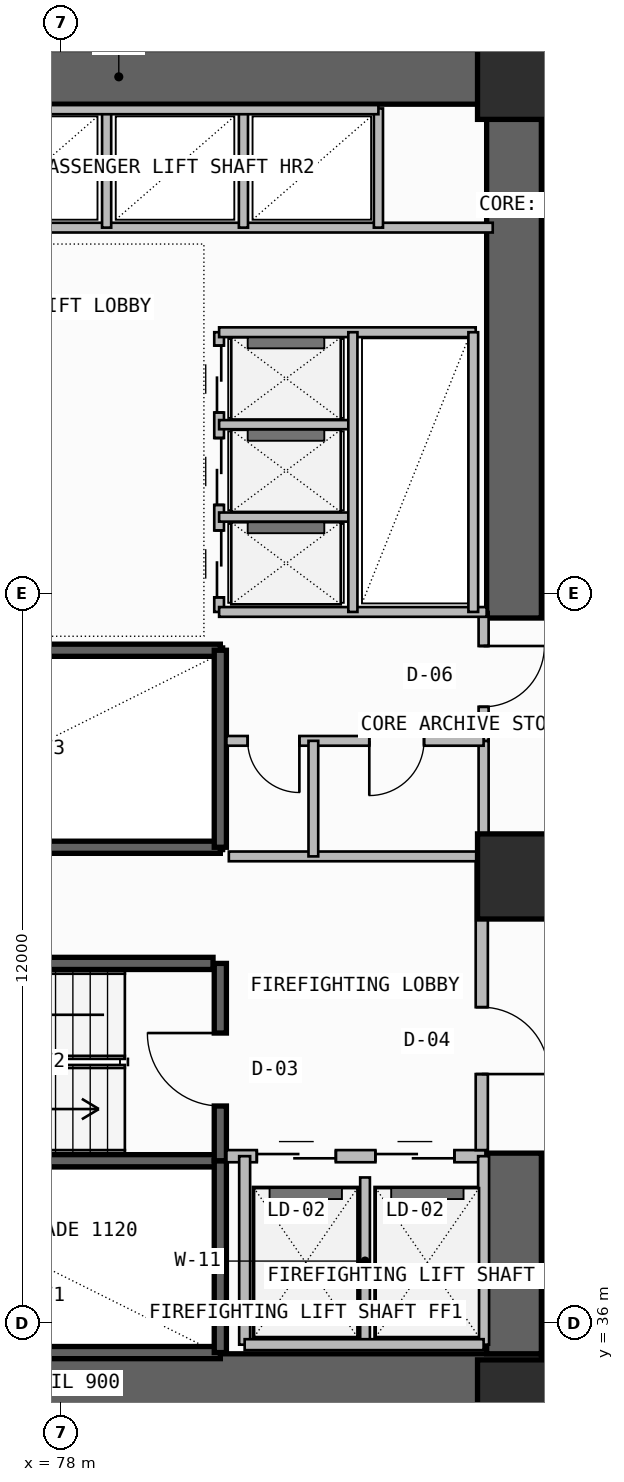
"""IFC4 building model, lengths in metres.
Left out: names, types, materials, properties, quantities, classifications, styles, units other than length and angle.
Written with IfcOpenShell. Run it as: python <this file> out.ifc"""

import sys

from ifc_helpers import new_model, si_unit, direction, frame, frame_2d, origin, origin_2d, place, context, subcontext, project, spatial, rectangle, extrude, element, fill, save


model = new_model("IFC4")
c1 = context("Model", 3, precision=1e-05, world=origin(), true_north=direction((0.0, 1.0)))
c2 = subcontext(c1, "Body", "Model", "MODEL_VIEW")
j1 = project(units=[si_unit("LENGTHUNIT", "METRE"), si_unit("PLANEANGLEUNIT", "RADIAN")], contexts=[c1])
p1 = place(None, origin())
s1 = spatial("IfcSite", under=j1, at=p1, CompositionType="ELEMENT")
p2 = place(p1, origin())
s2 = spatial("IfcBuilding", under=s1, at=p2, CompositionType="ELEMENT")
p3 = place(p2, frame((0.0, 0.0, 150.3)))
s3 = spatial("IfcBuildingStorey", under=s2, at=p3, CompositionType="ELEMENT", Elevation=150.3)
p4 = place(p3, frame((72.0, 35.05, -0.26), z_axis=(0.0, 0.0, 1.0), x_axis=(1.0, 0.0, 0.0)))
e1 = element("IfcWall", 1, at=p4, inside=s3, PredefinedType="SHEAR", context=c2, shape_type="SweptSolid", body=[
    extrude(rectangle(XDim=13.9, YDim=0.9, at=frame_2d((6.95, 0.0))), origin(), (0.0, 0.0, 1.0), 3.6),
])
p5 = place(p3, frame((85.45, 35.5, -0.26), z_axis=(0.0, 0.0, 1.0), x_axis=(0.0, 1.0, 0.0)))
e2 = element("IfcWall", 2, at=p5, inside=s3, PredefinedType="SHEAR", context=c2, shape_type="SweptSolid", body=[
    extrude(rectangle(XDim=3.3, YDim=0.9, at=frame_2d((1.65, 0.0))), origin(), (0.0, 0.0, 1.0), 3.6),
])
p6 = place(p3, frame((72.0, 56.5, -0.26), z_axis=(0.0, 0.0, 1.0), x_axis=(1.0, 0.0, 0.0)))
e3 = element("IfcWall", 3, at=p6, inside=s3, PredefinedType="SHEAR", context=c2, shape_type="SweptSolid", body=[
    extrude(rectangle(XDim=13.9, YDim=0.9, at=frame_2d((6.95, 0.0))), origin(), (0.0, 0.0, 1.0), 3.6),
])
p7 = place(p3, frame((85.45, 47.6, -0.26), z_axis=(0.0, 0.0, 1.0), x_axis=(0.0, 1.0, 0.0)))
e4 = element("IfcWall", 4, at=p7, inside=s3, PredefinedType="SHEAR", context=c2, shape_type="SweptSolid", body=[
    extrude(rectangle(XDim=8.45, YDim=0.9, at=frame_2d((4.225, 0.0))), origin(), (0.0, 0.0, 1.0), 3.6),
])
for number, where, z_axis, x_axis in (
    (5, (85.55, 34.7, 0.0), (0.0, 0.0, 1.0), (1.0, 0.0, 0.0)),
    (6, (85.55, 43.35, 0.0), (0.0, 0.0, 1.0), (1.0, 0.0, 0.0)),
    (7, (85.55, 56.5, 0.0), (0.0, 0.0, 1.0), (1.0, 0.0, 0.0)),
):
    element("IfcColumn", number, at=place(p3, frame(where, z_axis=z_axis, x_axis=x_axis)), inside=s3, PredefinedType="COLUMN", context=c2, shape_type="SweptSolid", body=[
        extrude(rectangle(XDim=1.4, YDim=1.4, at=origin_2d()), origin(), (0.0, 0.0, 1.0), 3.6),
    ])
for number, where, z_axis, x_axis in (
    (8, (72.92, 35.52, -0.26), (0.0, 0.0, 1.0), (1.0, 0.0, 0.0)),
    (9, (72.92, 38.675, -0.26), (0.0, 0.0, 1.0), (1.0, 0.0, 0.0)),
):
    element("IfcWall", number, at=place(p3, frame(where, z_axis=z_axis, x_axis=x_axis)), inside=s3, PredefinedType="SOLIDWALL", context=c2, shape_type="SweptSolid", body=[
        extrude(rectangle(XDim=7.7, YDim=0.2, at=frame_2d((3.85, 0.0))), origin(), (0.0, 0.0, 1.0), 3.6),
    ])
p8 = place(p3, frame((80.62, 35.52, -0.26), z_axis=(0.0, 0.0, 1.0), x_axis=(0.0, 1.0, 0.0)))
e10 = element("IfcWall", 10, at=p8, inside=s3, PredefinedType="SOLIDWALL", context=c2, shape_type="SweptSolid", body=[
    extrude(rectangle(XDim=3.155, YDim=0.2, at=frame_2d((1.578, 0.0))), origin(), (0.0, 0.0, 1.0), 3.6),
])
p9 = place(p3, frame((80.62, 38.675, -0.26), z_axis=(0.0, 0.0, 1.0), x_axis=(0.0, 1.0, 0.0)))
e11 = element("IfcWall", 11, at=p9, inside=s3, PredefinedType="SOLIDWALL", context=c2, shape_type="SweptSolid", body=[
    extrude(rectangle(XDim=3.245, YDim=0.2, at=frame_2d((1.623, 0.0))), origin(), (0.0, 0.0, 1.0), 3.6),
])
p10 = place(p9, frame((0.9, 0.0, 0.26)))
e12 = element("IfcOpeningElement", 12, at=p10, cuts=e11, PredefinedType="OPENING", context=c2, shape_type="SweptSolid", body=[
    extrude(rectangle(XDim=1.2, YDim=2.2, at=frame_2d((0.6, 1.1))), frame((0.0, 0.11, 0.0), z_axis=(0.0, -1.0, 0.0), x_axis=(1.0, 0.0, 0.0)), (0.0, 0.0, 1.0), 0.22),
])
p11 = place(p3, frame((80.72, 38.75, 0.0), z_axis=(0.0, 0.0, 1.0), x_axis=(1.0, 0.0, 0.0)))
e13 = element("IfcWall", 13, at=p11, inside=s3, PredefinedType="SOLIDWALL", context=c2, shape_type="SweptSolid", body=[
    extrude(rectangle(XDim=4.26, YDim=0.2, at=frame_2d((2.13, 0.0))), origin(), (0.0, 0.0, 1.0), 3.34),
])
p12 = place(p11, frame((0.5, 0.0, 0.0)))
e14 = element("IfcOpeningElement", 14, at=p12, cuts=e13, PredefinedType="OPENING", context=c2, shape_type="SweptSolid", body=[
    extrude(rectangle(XDim=1.3, YDim=2.3, at=frame_2d((0.65, 1.15))), frame((0.0, 0.11, 0.0), z_axis=(0.0, -1.0, 0.0), x_axis=(1.0, 0.0, 0.0)), (0.0, 0.0, 1.0), 0.22),
])
p13 = place(p11, frame((2.45, 0.0, 0.0)))
e15 = element("IfcOpeningElement", 15, at=p13, cuts=e13, PredefinedType="OPENING", context=c2, shape_type="SweptSolid", body=[
    extrude(rectangle(XDim=1.3, YDim=2.3, at=frame_2d((0.65, 1.15))), frame((0.0, 0.11, 0.0), z_axis=(0.0, -1.0, 0.0), x_axis=(1.0, 0.0, 0.0)), (0.0, 0.0, 1.0), 0.22),
])
p14 = place(p3, frame((83.0, 35.65, 0.0), z_axis=(0.0, 0.0, 1.0), x_axis=(0.0, 1.0, 0.0)))
e16 = element("IfcWall", 16, at=p14, inside=s3, PredefinedType="PLUMBINGWALL", context=c2, shape_type="SweptSolid", body=[
    extrude(rectangle(XDim=2.75, YDim=0.16, at=frame_2d((1.375, 0.0))), origin(), (0.0, 0.0, 1.0), 3.34),
])
for number, where, z_axis, x_axis in (
    (17, (84.95, 35.65, 0.0), (0.0, 0.0, 1.0), (0.0, 1.0, 0.0)),
    (18, (81.02, 35.65, 0.0), (0.0, 0.0, 1.0), (0.0, 1.0, 0.0)),
):
    element("IfcWall", number, at=place(p3, frame(where, z_axis=z_axis, x_axis=x_axis)), inside=s3, PredefinedType="SOLIDWALL", context=c2, shape_type="SweptSolid", body=[
        extrude(rectangle(XDim=3.1, YDim=0.18, at=frame_2d((1.55, 0.0))), origin(), (0.0, 0.0, 1.0), 3.34),
    ])
p15 = place(p3, frame((81.02, 35.65, 0.0), z_axis=(0.0, 0.0, 1.0), x_axis=(1.0, 0.0, 0.0)))
e19 = element("IfcWall", 19, at=p15, inside=s3, PredefinedType="SOLIDWALL", context=c2, shape_type="SweptSolid", body=[
    extrude(rectangle(XDim=3.93, YDim=0.18, at=frame_2d((1.965, 0.0))), origin(), (0.0, 0.0, 1.0), 3.34),
])
p16 = place(p3, frame((84.92, 38.85, 0.0), z_axis=(0.0, 0.0, 1.0), x_axis=(0.0, 1.0, 0.0)))
e20 = element("IfcWall", 20, at=p16, inside=s3, PredefinedType="SOLIDWALL", context=c2, shape_type="SweptSolid", body=[
    extrude(rectangle(XDim=4.83, YDim=0.2, at=frame_2d((2.415, 0.0))), origin(), (0.0, 0.0, 1.0), 3.34),
])
p17 = place(p16, frame((1.25, 0.0, 0.0)))
e21 = element("IfcOpeningElement", 21, at=p17, cuts=e20, PredefinedType="OPENING", context=c2, shape_type="SweptSolid", body=[
    extrude(rectangle(XDim=1.1, YDim=2.2, at=frame_2d((0.55, 1.1))), frame((0.0, 0.11, 0.0), z_axis=(0.0, -1.0, 0.0), x_axis=(1.0, 0.0, 0.0)), (0.0, 0.0, 1.0), 0.22),
])
p18 = place(p3, frame((72.92, 41.92, -0.26), z_axis=(0.0, 0.0, 1.0), x_axis=(1.0, 0.0, 0.0)))
e22 = element("IfcWall", 22, at=p18, inside=s3, PredefinedType="SOLIDWALL", context=c2, shape_type="SweptSolid", body=[
    extrude(rectangle(XDim=7.58, YDim=0.2, at=frame_2d((3.79, 0.0))), origin(), (0.0, 0.0, 1.0), 3.6),
])
for number, where, z_axis, x_axis in (
    (23, (72.92, 43.83, -0.26), (0.0, 0.0, 1.0), (1.0, 0.0, 0.0)),
    (24, (72.92, 47.07, -0.26), (0.0, 0.0, 1.0), (1.0, 0.0, 0.0)),
):
    element("IfcWall", number, at=place(p3, frame(where, z_axis=z_axis, x_axis=x_axis)), inside=s3, PredefinedType="SOLIDWALL", context=c2, shape_type="SweptSolid", body=[
        extrude(rectangle(XDim=7.7, YDim=0.2, at=frame_2d((3.85, 0.0))), origin(), (0.0, 0.0, 1.0), 3.6),
    ])
p19 = place(p3, frame((80.62, 43.83, -0.26), z_axis=(0.0, 0.0, 1.0), x_axis=(0.0, 1.0, 0.0)))
e25 = element("IfcWall", 25, at=p19, inside=s3, PredefinedType="SOLIDWALL", context=c2, shape_type="SweptSolid", body=[
    extrude(rectangle(XDim=3.24, YDim=0.2, at=frame_2d((1.62, 0.0))), origin(), (0.0, 0.0, 1.0), 3.6),
])
p20 = place(p3, frame((84.95, 43.68, 0.0), z_axis=(0.0, 0.0, 1.0), x_axis=(0.0, 1.0, 0.0)))
e26 = element("IfcWall", 26, at=p20, inside=s3, PredefinedType="PLUMBINGWALL", context=c2, shape_type="SweptSolid", body=[
    extrude(rectangle(XDim=1.9, YDim=0.165, at=frame_2d((0.95, 0.0))), origin(), (0.0, 0.0, 1.0), 3.34),
])
p21 = place(p3, frame((84.95, 45.58, 0.0), z_axis=(0.0, 0.0, 1.0), x_axis=(0.0, 1.0, 0.0)))
e27 = element("IfcWall", 27, at=p21, inside=s3, PredefinedType="PARTITIONING", context=c2, shape_type="SweptSolid", body=[
    extrude(rectangle(XDim=2.12, YDim=0.165, at=frame_2d((1.06, 0.0))), origin(), (0.0, 0.0, 1.0), 3.34),
])
p22 = place(p21, frame((0.56, 0.0, 0.0)))
e28 = element("IfcOpeningElement", 28, at=p22, cuts=e27, PredefinedType="OPENING", context=c2, shape_type="SweptSolid", body=[
    extrude(rectangle(XDim=1.0, YDim=2.2, at=frame_2d((0.5, 1.1))), frame((0.0, 0.093, 0.0), z_axis=(0.0, -1.0, 0.0), x_axis=(1.0, 0.0, 0.0)), (0.0, 0.0, 1.0), 0.185),
])
p23 = place(p3, frame((80.72, 45.58, 0.0), z_axis=(0.0, 0.0, 1.0), x_axis=(1.0, 0.0, 0.0)))
e29 = element("IfcWall", 29, at=p23, inside=s3, PredefinedType="PLUMBINGWALL", context=c2, shape_type="SweptSolid", body=[
    extrude(rectangle(XDim=4.23, YDim=0.16, at=frame_2d((2.115, 0.0))), origin(), (0.0, 0.0, 1.0), 3.34),
])
p24 = place(p23, frame((0.35, 0.0, 0.0)))
e30 = element("IfcOpeningElement", 30, at=p24, cuts=e29, PredefinedType="OPENING", context=c2, shape_type="SweptSolid", body=[
    extrude(rectangle(XDim=0.85, YDim=2.05, at=frame_2d((0.425, 1.025))), frame((0.0, 0.09, 0.0), z_axis=(0.0, -1.0, 0.0), x_axis=(1.0, 0.0, 0.0)), (0.0, 0.0, 1.0), 0.18),
])
p25 = place(p23, frame((2.35, 0.0, 0.0)))
e31 = element("IfcOpeningElement", 31, at=p25, cuts=e29, PredefinedType="OPENING", context=c2, shape_type="SweptSolid", body=[
    extrude(rectangle(XDim=0.9, YDim=2.1, at=frame_2d((0.45, 1.05))), frame((0.0, 0.09, 0.0), z_axis=(0.0, -1.0, 0.0), x_axis=(1.0, 0.0, 0.0)), (0.0, 0.0, 1.0), 0.18),
])
p26 = place(p3, frame((80.76, 43.68, 0.0), z_axis=(0.0, 0.0, 1.0), x_axis=(1.0, 0.0, 0.0)))
e32 = element("IfcWall", 32, at=p26, inside=s3, PredefinedType="PLUMBINGWALL", context=c2, shape_type="SweptSolid", body=[
    extrude(rectangle(XDim=4.19, YDim=0.16, at=frame_2d((2.095, 0.0))), origin(), (0.0, 0.0, 1.0), 3.34),
])
p27 = place(p3, frame((82.15, 43.68, 0.0), z_axis=(0.0, 0.0, 1.0), x_axis=(0.0, 1.0, 0.0)))
e33 = element("IfcWall", 33, at=p27, inside=s3, PredefinedType="PLUMBINGWALL", context=c2, shape_type="SweptSolid", body=[
    extrude(rectangle(XDim=1.9, YDim=0.16, at=frame_2d((0.95, 0.0))), origin(), (0.0, 0.0, 1.0), 3.34),
])
p28 = place(p3, frame((80.6, 47.7, 0.0), z_axis=(0.0, 0.0, 1.0), x_axis=(0.0, 1.0, 0.0)))
e34 = element("IfcWall", 34, at=p28, inside=s3, PredefinedType="SOLIDWALL", context=c2, shape_type="SweptSolid", body=[
    extrude(rectangle(XDim=4.6, YDim=0.16, at=frame_2d((2.3, 0.0))), origin(), (0.0, 0.0, 1.0), 3.34),
])
p29 = place(p28, frame((0.24, 0.0, 0.0)))
e35 = element("IfcOpeningElement", 35, at=p29, cuts=e34, PredefinedType="OPENING", context=c2, shape_type="SweptSolid", body=[
    extrude(rectangle(XDim=1.1, YDim=2.25, at=frame_2d((0.55, 1.125))), frame((0.0, 0.09, 0.0), z_axis=(0.0, -1.0, 0.0), x_axis=(1.0, 0.0, 0.0)), (0.0, 0.0, 1.0), 0.18),
])
p30 = place(p28, frame((1.76, 0.0, 0.0)))
e36 = element("IfcOpeningElement", 36, at=p30, cuts=e34, PredefinedType="OPENING", context=c2, shape_type="SweptSolid", body=[
    extrude(rectangle(XDim=1.1, YDim=2.25, at=frame_2d((0.55, 1.125))), frame((0.0, 0.09, 0.0), z_axis=(0.0, -1.0, 0.0), x_axis=(1.0, 0.0, 0.0)), (0.0, 0.0, 1.0), 0.18),
])
p31 = place(p28, frame((3.28, 0.0, 0.0)))
e37 = element("IfcOpeningElement", 37, at=p31, cuts=e34, PredefinedType="OPENING", context=c2, shape_type="SweptSolid", body=[
    extrude(rectangle(XDim=1.1, YDim=2.25, at=frame_2d((0.55, 1.125))), frame((0.0, 0.09, 0.0), z_axis=(0.0, -1.0, 0.0), x_axis=(1.0, 0.0, 0.0)), (0.0, 0.0, 1.0), 0.18),
])
p32 = place(p3, frame((80.6, 47.7, 0.0), z_axis=(0.0, 0.0, 1.0), x_axis=(1.0, 0.0, 0.0)))
e38 = element("IfcWall", 38, at=p32, inside=s3, PredefinedType="SOLIDWALL", context=c2, shape_type="SweptSolid", body=[
    extrude(rectangle(XDim=4.4, YDim=0.16, at=frame_2d((2.2, 0.0))), origin(), (0.0, 0.0, 1.0), 3.34),
])
p33 = place(p3, frame((80.6, 52.3, 0.0), z_axis=(0.0, 0.0, 1.0), x_axis=(1.0, 0.0, 0.0)))
e39 = element("IfcWall", 39, at=p33, inside=s3, PredefinedType="SOLIDWALL", context=c2, shape_type="SweptSolid", body=[
    extrude(rectangle(XDim=4.22, YDim=0.16, at=frame_2d((2.11, 0.0))), origin(), (0.0, 0.0, 1.0), 3.34),
])
for number, where, z_axis, x_axis in (
    (40, (80.6, 49.26, 0.0), (0.0, 0.0, 1.0), (1.0, 0.0, 0.0)),
    (41, (80.6, 50.78, 0.0), (0.0, 0.0, 1.0), (1.0, 0.0, 0.0)),
):
    element("IfcWall", number, at=place(p3, frame(where, z_axis=z_axis, x_axis=x_axis)), inside=s3, PredefinedType="PLUMBINGWALL", context=c2, shape_type="SweptSolid", body=[
        extrude(rectangle(XDim=2.2, YDim=0.15, at=frame_2d((1.1, 0.0))), origin(), (0.0, 0.0, 1.0), 3.34),
    ])
p34 = place(p3, frame((82.8, 47.7, 0.0), z_axis=(0.0, 0.0, 1.0), x_axis=(0.0, 1.0, 0.0)))
e42 = element("IfcWall", 42, at=p34, inside=s3, PredefinedType="PLUMBINGWALL", context=c2, shape_type="SweptSolid", body=[
    extrude(rectangle(XDim=4.6, YDim=0.15, at=frame_2d((2.3, 0.0))), origin(), (0.0, 0.0, 1.0), 3.34),
])
p35 = place(p3, frame((84.78, 47.7, 0.0), z_axis=(0.0, 0.0, 1.0), x_axis=(0.0, 1.0, 0.0)))
e43 = element("IfcWall", 43, at=p35, inside=s3, PredefinedType="SOLIDWALL", context=c2, shape_type="SweptSolid", body=[
    extrude(rectangle(XDim=4.6, YDim=0.16, at=frame_2d((2.3, 0.0))), origin(), (0.0, 0.0, 1.0), 3.34),
])
p36 = place(p3, frame((73.02, 54.02, 0.0), z_axis=(0.0, 0.0, 1.0), x_axis=(1.0, 0.0, 0.0)))
e44 = element("IfcWall", 44, at=p36, inside=s3, PredefinedType="SOLIDWALL", context=c2, shape_type="SweptSolid", body=[
    extrude(rectangle(XDim=12.08, YDim=0.16, at=frame_2d((6.04, 0.0))), origin(), (0.0, 0.0, 1.0), 3.34),
])
for number, where, z_axis, x_axis in (
    (45, (78.75, 54.02, 0.0), (0.0, 0.0, 1.0), (0.0, 1.0, 0.0)),
    (46, (81.0, 54.02, 0.0), (0.0, 0.0, 1.0), (0.0, 1.0, 0.0)),
):
    element("IfcWall", number, at=place(p3, frame(where, z_axis=z_axis, x_axis=x_axis)), inside=s3, PredefinedType="PLUMBINGWALL", context=c2, shape_type="SweptSolid", body=[
        extrude(rectangle(XDim=1.96, YDim=0.15, at=frame_2d((0.98, 0.0))), origin(), (0.0, 0.0, 1.0), 3.34),
    ])
p37 = place(p3, frame((83.22, 54.02, 0.0), z_axis=(0.0, 0.0, 1.0), x_axis=(0.0, 1.0, 0.0)))
e47 = element("IfcWall", 47, at=p37, inside=s3, PredefinedType="SOLIDWALL", context=c2, shape_type="SweptSolid", body=[
    extrude(rectangle(XDim=1.96, YDim=0.15, at=frame_2d((0.98, 0.0))), origin(), (0.0, 0.0, 1.0), 3.34),
])
p38 = place(p3, frame((76.52, 55.96, 0.0), z_axis=(0.0, 0.0, 1.0), x_axis=(1.0, 0.0, 0.0)))
e48 = element("IfcWall", 48, at=p38, inside=s3, PredefinedType="SOLIDWALL", context=c2, shape_type="SweptSolid", body=[
    extrude(rectangle(XDim=6.7, YDim=0.15, at=frame_2d((3.35, 0.0))), origin(), (0.0, 0.0, 1.0), 3.34),
])
p39 = place(p10, origin())
e49 = element("IfcDoor", 49, at=p39, inside=s3, OperationType="SINGLE_SWING_RIGHT", PredefinedType="USERDEFINED", context=c2, shape_type="SweptSolid", body=[
    extrude(rectangle(XDim=1.2, YDim=2.2, at=frame_2d((0.6, 1.1))), frame((0.0, 0.025, 0.0), z_axis=(0.0, -1.0, 0.0), x_axis=(1.0, 0.0, 0.0)), (0.0, 0.0, 1.0), 0.05),
])
fill(e12, e49)
p40 = place(p12, origin())
e50 = element("IfcDoor", 50, at=p40, inside=s3, OperationType="DOUBLE_DOOR_SLIDING", PredefinedType="DOOR", context=c2, shape_type="SweptSolid", body=[
    extrude(rectangle(XDim=1.3, YDim=2.3, at=frame_2d((0.65, 1.15))), frame((0.0, 0.025, 0.0), z_axis=(0.0, -1.0, 0.0), x_axis=(1.0, 0.0, 0.0)), (0.0, 0.0, 1.0), 0.05),
])
fill(e14, e50)
p41 = place(p13, origin())
e51 = element("IfcDoor", 51, at=p41, inside=s3, OperationType="DOUBLE_DOOR_SLIDING", PredefinedType="DOOR", context=c2, shape_type="SweptSolid", body=[
    extrude(rectangle(XDim=1.3, YDim=2.3, at=frame_2d((0.65, 1.15))), frame((0.0, 0.025, 0.0), z_axis=(0.0, -1.0, 0.0), x_axis=(1.0, 0.0, 0.0)), (0.0, 0.0, 1.0), 0.05),
])
fill(e15, e51)
p42 = place(p17, frame((1.1, 0.0, 0.0), z_axis=(0.0, 0.0, 1.0), x_axis=(-1.0, 0.0, 0.0)))
e52 = element("IfcDoor", 52, at=p42, inside=s3, OperationType="SINGLE_SWING_RIGHT", PredefinedType="DOOR", context=c2, shape_type="SweptSolid", body=[
    extrude(rectangle(XDim=1.1, YDim=2.2, at=frame_2d((0.55, 1.1))), frame((0.0, 0.025, 0.0), z_axis=(0.0, -1.0, 0.0), x_axis=(1.0, 0.0, 0.0)), (0.0, 0.0, 1.0), 0.05),
])
fill(e21, e52)
p43 = place(p22, frame((1.0, 0.0, 0.0), z_axis=(0.0, 0.0, 1.0), x_axis=(-1.0, 0.0, 0.0)))
e53 = element("IfcDoor", 53, at=p43, inside=s3, OperationType="SINGLE_SWING_LEFT", PredefinedType="DOOR", context=c2, shape_type="SweptSolid", body=[
    extrude(rectangle(XDim=1.0, YDim=2.2, at=frame_2d((0.5, 1.1))), frame((0.0, 0.025, 0.0), z_axis=(0.0, -1.0, 0.0), x_axis=(1.0, 0.0, 0.0)), (0.0, 0.0, 1.0), 0.05),
])
fill(e28, e53)
p44 = place(p24, frame((0.85, 0.0, 0.0), z_axis=(0.0, 0.0, 1.0), x_axis=(-1.0, 0.0, 0.0)))
e54 = element("IfcDoor", 54, at=p44, inside=s3, OperationType="SINGLE_SWING_LEFT", PredefinedType="DOOR", context=c2, shape_type="SweptSolid", body=[
    extrude(rectangle(XDim=0.85, YDim=2.05, at=frame_2d((0.425, 1.025))), frame((0.0, 0.025, 0.0), z_axis=(0.0, -1.0, 0.0), x_axis=(1.0, 0.0, 0.0)), (0.0, 0.0, 1.0), 0.05),
])
fill(e30, e54)
p45 = place(p25, frame((0.9, 0.0, 0.0), z_axis=(0.0, 0.0, 1.0), x_axis=(-1.0, 0.0, 0.0)))
e55 = element("IfcDoor", 55, at=p45, inside=s3, OperationType="SINGLE_SWING_RIGHT", PredefinedType="DOOR", context=c2, shape_type="SweptSolid", body=[
    extrude(rectangle(XDim=0.9, YDim=2.1, at=frame_2d((0.45, 1.05))), frame((0.0, 0.025, 0.0), z_axis=(0.0, -1.0, 0.0), x_axis=(1.0, 0.0, 0.0)), (0.0, 0.0, 1.0), 0.05),
])
fill(e31, e55)
p46 = place(p29, frame((1.1, 0.0, 0.0), z_axis=(0.0, 0.0, 1.0), x_axis=(-1.0, 0.0, 0.0)))
e56 = element("IfcDoor", 56, at=p46, inside=s3, OperationType="DOUBLE_DOOR_SLIDING", PredefinedType="DOOR", context=c2, shape_type="SweptSolid", body=[
    extrude(rectangle(XDim=1.1, YDim=2.25, at=frame_2d((0.55, 1.125))), frame((0.0, 0.025, 0.0), z_axis=(0.0, -1.0, 0.0), x_axis=(1.0, 0.0, 0.0)), (0.0, 0.0, 1.0), 0.05),
])
fill(e35, e56)
p47 = place(p30, frame((1.1, 0.0, 0.0), z_axis=(0.0, 0.0, 1.0), x_axis=(-1.0, 0.0, 0.0)))
e57 = element("IfcDoor", 57, at=p47, inside=s3, OperationType="DOUBLE_DOOR_SLIDING", PredefinedType="DOOR", context=c2, shape_type="SweptSolid", body=[
    extrude(rectangle(XDim=1.1, YDim=2.25, at=frame_2d((0.55, 1.125))), frame((0.0, 0.025, 0.0), z_axis=(0.0, -1.0, 0.0), x_axis=(1.0, 0.0, 0.0)), (0.0, 0.0, 1.0), 0.05),
])
fill(e36, e57)
p48 = place(p31, frame((1.1, 0.0, 0.0), z_axis=(0.0, 0.0, 1.0), x_axis=(-1.0, 0.0, 0.0)))
e58 = element("IfcDoor", 58, at=p48, inside=s3, OperationType="DOUBLE_DOOR_SLIDING", PredefinedType="DOOR", context=c2, shape_type="SweptSolid", body=[
    extrude(rectangle(XDim=1.1, YDim=2.25, at=frame_2d((0.55, 1.125))), frame((0.0, 0.025, 0.0), z_axis=(0.0, -1.0, 0.0), x_axis=(1.0, 0.0, 0.0)), (0.0, 0.0, 1.0), 0.05),
])
fill(e37, e58)
save(model, sys.argv[1])
